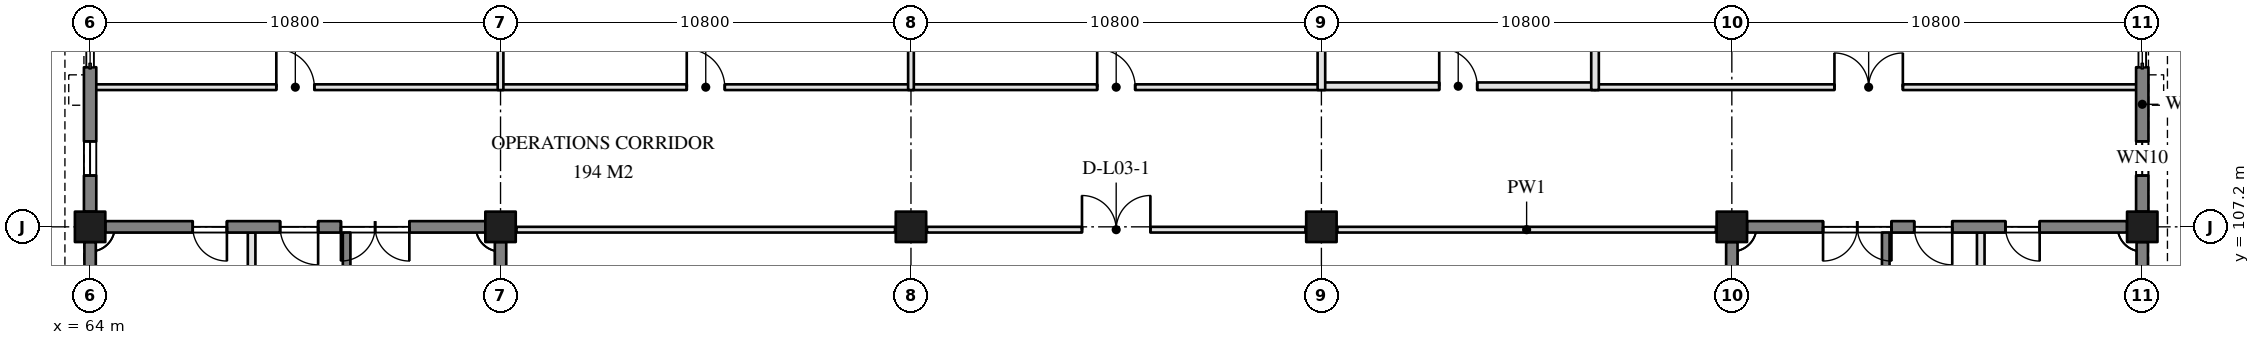
"""IFC4 building model, lengths in metres.
Left out: names, types, materials, properties, quantities, classifications, styles, units other than length and angle.
Written with IfcOpenShell. Run it as: python <this file> out.ifc"""

import sys

from ifc_helpers import new_model, si_unit, direction, frame, frame_2d, origin, origin_2d, place, context, subcontext, project, spatial, rectangle, extrude, element, fill, save


model = new_model("IFC4")
c1 = context("Model", 3, precision=1e-05, world=origin(), true_north=direction((0.0, 1.0)))
c2 = subcontext(c1, "Body", "Model", "MODEL_VIEW")
j1 = project(units=[si_unit("LENGTHUNIT", "METRE"), si_unit("PLANEANGLEUNIT", "RADIAN")], contexts=[c1])
p1 = place(None, origin())
s1 = spatial("IfcSite", under=j1, at=p1, CompositionType="ELEMENT")
p2 = place(p1, origin())
s2 = spatial("IfcBuilding", under=s1, at=p2, CompositionType="ELEMENT")
p3 = place(p2, frame((0.0, 0.0, 12.6)))
s3 = spatial("IfcBuildingStorey", under=s2, at=p3, CompositionType="ELEMENT", Elevation=12.6)
for number, where, z_axis, x_axis in (
    (1, (64.0, 107.2, 0.0), (0.0, 0.0, 1.0), (1.0, 0.0, 0.0)),
    (2, (74.8, 107.2, 0.0), (0.0, 0.0, 1.0), (1.0, 0.0, 0.0)),
    (3, (85.6, 107.2, 0.0), (0.0, 0.0, 1.0), (1.0, 0.0, 0.0)),
    (4, (96.4, 107.2, 0.0), (0.0, 0.0, 1.0), (1.0, 0.0, 0.0)),
    (5, (107.2, 107.2, 0.0), (0.0, 0.0, 1.0), (1.0, 0.0, 0.0)),
    (6, (118.0, 107.2, 0.0), (0.0, 0.0, 1.0), (1.0, 0.0, 0.0)),
):
    element("IfcColumn", number, at=place(p3, frame(where, z_axis=z_axis, x_axis=x_axis)), inside=s3, PredefinedType="COLUMN", context=c2, shape_type="SweptSolid", body=[
        extrude(rectangle(XDim=0.8, YDim=0.8, at=origin_2d()), origin(), (0.0, 0.0, 1.0), 3.9),
    ])
p4 = place(p3, frame((74.8, 96.8, 0.0), z_axis=(0.0, 0.0, 1.0), x_axis=(0.0, 1.0, 0.0)))
e7 = element("IfcWall", 7, at=p4, inside=s3, PredefinedType="SOLIDWALL", context=c2, shape_type="SweptSolid", body=[
    extrude(rectangle(XDim=10.0, YDim=0.3, at=frame_2d((5.0, 0.0))), origin(), (0.0, 0.0, 1.0), 3.9),
])
p5 = place(p3, frame((74.4, 107.2, 0.0), z_axis=(0.0, 0.0, 1.0), x_axis=(-1.0, 0.0, 0.0)))
e8 = element("IfcWall", 8, at=p5, inside=s3, PredefinedType="SOLIDWALL", context=c2, shape_type="SweptSolid", body=[
    extrude(rectangle(XDim=10.0, YDim=0.3, at=frame_2d((5.0, 0.0))), origin(), (0.0, 0.0, 1.0), 3.9),
])
p6 = place(p5, frame((2.0, 0.0, 0.0)))
e9 = element("IfcOpeningElement", 9, at=p6, cuts=e8, PredefinedType="OPENING", context=c2, shape_type="SweptSolid", body=[
    extrude(rectangle(XDim=1.8, YDim=2.1, at=frame_2d((0.9, 1.05))), frame((0.0, 0.16, 0.0), z_axis=(0.0, -1.0, 0.0), x_axis=(1.0, 0.0, 0.0)), (0.0, 0.0, 1.0), 0.32),
])
p7 = place(p5, frame((4.4, 0.0, 0.0)))
e10 = element("IfcOpeningElement", 10, at=p7, cuts=e8, PredefinedType="OPENING", context=c2, shape_type="SweptSolid", body=[
    extrude(rectangle(XDim=1.0, YDim=2.1, at=frame_2d((0.5, 1.05))), frame((0.0, 0.16, 0.0), z_axis=(0.0, -1.0, 0.0), x_axis=(1.0, 0.0, 0.0)), (0.0, 0.0, 1.0), 0.32),
])
p8 = place(p5, frame((6.8, 0.0, 0.0)))
e11 = element("IfcOpeningElement", 11, at=p8, cuts=e8, PredefinedType="OPENING", context=c2, shape_type="SweptSolid", body=[
    extrude(rectangle(XDim=0.9, YDim=2.1, at=frame_2d((0.45, 1.05))), frame((0.0, 0.16, 0.0), z_axis=(0.0, -1.0, 0.0), x_axis=(1.0, 0.0, 0.0)), (0.0, 0.0, 1.0), 0.32),
])
for number, where, z_axis, x_axis in (
    (12, (64.0, 106.8, 0.0), (0.0, 0.0, 1.0), (0.0, -1.0, 0.0)),
    (13, (118.0, 96.8, 0.0), (0.0, 0.0, 1.0), (0.0, 1.0, 0.0)),
):
    element("IfcWall", number, at=place(p3, frame(where, z_axis=z_axis, x_axis=x_axis)), inside=s3, PredefinedType="SOLIDWALL", context=c2, shape_type="SweptSolid", body=[
        extrude(rectangle(XDim=10.0, YDim=0.3, at=frame_2d((5.0, 0.0))), origin(), (0.0, 0.0, 1.0), 3.9),
    ])
p9 = place(p3, frame((117.6, 107.2, 0.0), z_axis=(0.0, 0.0, 1.0), x_axis=(-1.0, 0.0, 0.0)))
e14 = element("IfcWall", 14, at=p9, inside=s3, PredefinedType="SOLIDWALL", context=c2, shape_type="SweptSolid", body=[
    extrude(rectangle(XDim=10.0, YDim=0.3, at=frame_2d((5.0, 0.0))), origin(), (0.0, 0.0, 1.0), 3.9),
])
p10 = place(p9, frame((6.2, 0.0, 0.0)))
e15 = element("IfcOpeningElement", 15, at=p10, cuts=e14, PredefinedType="OPENING", context=c2, shape_type="SweptSolid", body=[
    extrude(rectangle(XDim=1.8, YDim=2.1, at=frame_2d((0.9, 1.05))), frame((0.0, 0.16, 0.0), z_axis=(0.0, -1.0, 0.0), x_axis=(1.0, 0.0, 0.0)), (0.0, 0.0, 1.0), 0.32),
])
p11 = place(p9, frame((4.6, 0.0, 0.0)))
e16 = element("IfcOpeningElement", 16, at=p11, cuts=e14, PredefinedType="OPENING", context=c2, shape_type="SweptSolid", body=[
    extrude(rectangle(XDim=1.0, YDim=2.1, at=frame_2d((0.5, 1.05))), frame((0.0, 0.16, 0.0), z_axis=(0.0, -1.0, 0.0), x_axis=(1.0, 0.0, 0.0)), (0.0, 0.0, 1.0), 0.32),
])
p12 = place(p9, frame((2.3, 0.0, 0.0)))
e17 = element("IfcOpeningElement", 17, at=p12, cuts=e14, PredefinedType="OPENING", context=c2, shape_type="SweptSolid", body=[
    extrude(rectangle(XDim=0.9, YDim=2.1, at=frame_2d((0.45, 1.05))), frame((0.0, 0.16, 0.0), z_axis=(0.0, -1.0, 0.0), x_axis=(1.0, 0.0, 0.0)), (0.0, 0.0, 1.0), 0.32),
])
p13 = place(p3, frame((107.2, 106.8, 0.0), z_axis=(0.0, 0.0, 1.0), x_axis=(0.0, -1.0, 0.0)))
e18 = element("IfcWall", 18, at=p13, inside=s3, PredefinedType="SOLIDWALL", context=c2, shape_type="SweptSolid", body=[
    extrude(rectangle(XDim=10.0, YDim=0.3, at=frame_2d((5.0, 0.0))), origin(), (0.0, 0.0, 1.0), 3.9),
])
p14 = place(p3, frame((64.0, 107.6, 0.0), z_axis=(0.0, 0.0, 1.0), x_axis=(0.0, 1.0, 0.0)))
e19 = element("IfcWall", 19, at=p14, inside=s3, PredefinedType="SOLIDWALL", context=c2, shape_type="SweptSolid", body=[
    extrude(rectangle(XDim=3.8, YDim=0.325, at=frame_2d((1.9, 0.0))), origin(), (0.0, 0.0, 1.0), 2.8),
])
p15 = place(p14, frame((0.95, 0.0, 0.7)))
e20 = element("IfcOpeningElement", 20, at=p15, cuts=e19, PredefinedType="OPENING", context=c2, shape_type="SweptSolid", body=[
    extrude(rectangle(XDim=0.9, YDim=2.0, at=frame_2d((0.45, 1.0))), frame((0.0, 0.172, 0.0), z_axis=(0.0, -1.0, 0.0), x_axis=(1.0, 0.0, 0.0)), (0.0, 0.0, 1.0), 0.345),
])
p16 = place(p3, frame((118.0, 107.6, 0.0), z_axis=(0.0, 0.0, 1.0), x_axis=(0.0, 1.0, 0.0)))
e21 = element("IfcWall", 21, at=p16, inside=s3, PredefinedType="SOLIDWALL", context=c2, shape_type="SweptSolid", body=[
    extrude(rectangle(XDim=3.8, YDim=0.325, at=frame_2d((1.9, 0.0))), origin(), (0.0, 0.0, 1.0), 2.8),
])
p17 = place(p16, frame((0.95, 0.0, 0.7)))
e22 = element("IfcOpeningElement", 22, at=p17, cuts=e21, PredefinedType="OPENING", context=c2, shape_type="SweptSolid", body=[
    extrude(rectangle(XDim=0.9, YDim=2.0, at=frame_2d((0.45, 1.0))), frame((0.0, 0.172, 0.0), z_axis=(0.0, -1.0, 0.0), x_axis=(1.0, 0.0, 0.0)), (0.0, 0.0, 1.0), 0.345),
])
p18 = place(p3, frame((70.75, 104.8, 0.0), z_axis=(0.0, 0.0, 1.0), x_axis=(0.0, 1.0, 0.0)))
e23 = element("IfcWall", 23, at=p18, inside=s3, PredefinedType="SOLIDWALL", context=c2, shape_type="SweptSolid", body=[
    extrude(rectangle(XDim=2.25, YDim=0.2, at=frame_2d((1.125, 0.0))), origin(), (0.0, 0.0, 1.0), 3.6),
])
p19 = place(p3, frame((68.25, 104.8, 0.0), z_axis=(0.0, 0.0, 1.0), x_axis=(0.0, 1.0, 0.0)))
e24 = element("IfcWall", 24, at=p19, inside=s3, PredefinedType="PARTITIONING", context=c2, shape_type="SweptSolid", body=[
    extrude(rectangle(XDim=2.25, YDim=0.2, at=frame_2d((1.125, 0.0))), origin(), (0.0, 0.0, 1.0), 3.6),
])
p20 = place(p3, frame((111.25, 107.05, 0.0), z_axis=(0.0, 0.0, 1.0), x_axis=(0.0, -1.0, 0.0)))
e25 = element("IfcWall", 25, at=p20, inside=s3, PredefinedType="SOLIDWALL", context=c2, shape_type="SweptSolid", body=[
    extrude(rectangle(XDim=2.25, YDim=0.2, at=frame_2d((1.125, 0.0))), origin(), (0.0, 0.0, 1.0), 3.6),
])
p21 = place(p3, frame((113.75, 107.05, 0.0), z_axis=(0.0, 0.0, 1.0), x_axis=(0.0, -1.0, 0.0)))
e26 = element("IfcWall", 26, at=p21, inside=s3, PredefinedType="PARTITIONING", context=c2, shape_type="SweptSolid", body=[
    extrude(rectangle(XDim=2.25, YDim=0.2, at=frame_2d((1.125, 0.0))), origin(), (0.0, 0.0, 1.0), 3.6),
])
p22 = place(p3, frame((96.82, 107.125, 0.0), z_axis=(0.0, 0.0, 1.0), x_axis=(1.0, 0.0, 0.0)))
e27 = element("IfcWall", 27, at=p22, inside=s3, PredefinedType="PARTITIONING", context=c2, shape_type="SweptSolid", body=[
    extrude(rectangle(XDim=9.96, YDim=0.15, at=frame_2d((4.98, 0.0))), origin(), (0.0, 0.0, 1.0), 2.8),
])
p23 = place(p3, frame((86.02, 107.125, 0.0), z_axis=(0.0, 0.0, 1.0), x_axis=(1.0, 0.0, 0.0)))
e28 = element("IfcWall", 28, at=p23, inside=s3, PredefinedType="PARTITIONING", context=c2, shape_type="SweptSolid", body=[
    extrude(rectangle(XDim=9.96, YDim=0.15, at=frame_2d((4.98, 0.0))), origin(), (0.0, 0.0, 1.0), 2.8),
])
p24 = place(p23, frame((4.08, 0.0, 0.0)))
e29 = element("IfcOpeningElement", 29, at=p24, cuts=e28, PredefinedType="OPENING", context=c2, shape_type="SweptSolid", body=[
    extrude(rectangle(XDim=1.8, YDim=2.1, at=frame_2d((0.9, 1.05))), frame((0.0, 0.085, 0.0), z_axis=(0.0, -1.0, 0.0), x_axis=(1.0, 0.0, 0.0)), (0.0, 0.0, 1.0), 0.17),
])
p25 = place(p3, frame((75.22, 107.125, 0.0), z_axis=(0.0, 0.0, 1.0), x_axis=(1.0, 0.0, 0.0)))
e30 = element("IfcWall", 30, at=p25, inside=s3, PredefinedType="PARTITIONING", context=c2, shape_type="SweptSolid", body=[
    extrude(rectangle(XDim=9.96, YDim=0.15, at=frame_2d((4.98, 0.0))), origin(), (0.0, 0.0, 1.0), 2.8),
])
p26 = place(p3, frame((64.0, 110.875, 0.0), z_axis=(0.0, 0.0, 1.0), x_axis=(1.0, 0.0, 0.0)))
e31 = element("IfcWall", 31, at=p26, inside=s3, PredefinedType="PARTITIONING", context=c2, shape_type="SweptSolid", body=[
    extrude(rectangle(XDim=10.8, YDim=0.15, at=frame_2d((5.4, 0.0))), origin(), (0.0, 0.0, 1.0), 2.8),
])
p27 = place(p26, frame((4.9, 0.0, 0.0)))
e32 = element("IfcOpeningElement", 32, at=p27, cuts=e31, PredefinedType="OPENING", context=c2, shape_type="SweptSolid", body=[
    extrude(rectangle(XDim=1.0, YDim=2.1, at=frame_2d((0.5, 1.05))), frame((0.0, 0.085, 0.0), z_axis=(0.0, -1.0, 0.0), x_axis=(1.0, 0.0, 0.0)), (0.0, 0.0, 1.0), 0.17),
])
p28 = place(p3, frame((74.8, 110.875, 0.0), z_axis=(0.0, 0.0, 1.0), x_axis=(1.0, 0.0, 0.0)))
e33 = element("IfcWall", 33, at=p28, inside=s3, PredefinedType="PARTITIONING", context=c2, shape_type="SweptSolid", body=[
    extrude(rectangle(XDim=10.8, YDim=0.15, at=frame_2d((5.4, 0.0))), origin(), (0.0, 0.0, 1.0), 2.8),
])
p29 = place(p28, frame((4.9, 0.0, 0.0)))
e34 = element("IfcOpeningElement", 34, at=p29, cuts=e33, PredefinedType="OPENING", context=c2, shape_type="SweptSolid", body=[
    extrude(rectangle(XDim=1.0, YDim=2.1, at=frame_2d((0.5, 1.05))), frame((0.0, 0.085, 0.0), z_axis=(0.0, -1.0, 0.0), x_axis=(1.0, 0.0, 0.0)), (0.0, 0.0, 1.0), 0.17),
])
p30 = place(p3, frame((85.6, 110.875, 0.0), z_axis=(0.0, 0.0, 1.0), x_axis=(1.0, 0.0, 0.0)))
e35 = element("IfcWall", 35, at=p30, inside=s3, PredefinedType="PARTITIONING", context=c2, shape_type="SweptSolid", body=[
    extrude(rectangle(XDim=10.8, YDim=0.15, at=frame_2d((5.4, 0.0))), origin(), (0.0, 0.0, 1.0), 2.8),
])
p31 = place(p30, frame((4.9, 0.0, 0.0)))
e36 = element("IfcOpeningElement", 36, at=p31, cuts=e35, PredefinedType="OPENING", context=c2, shape_type="SweptSolid", body=[
    extrude(rectangle(XDim=1.0, YDim=2.1, at=frame_2d((0.5, 1.05))), frame((0.0, 0.085, 0.0), z_axis=(0.0, -1.0, 0.0), x_axis=(1.0, 0.0, 0.0)), (0.0, 0.0, 1.0), 0.17),
])
p32 = place(p3, frame((96.4, 110.9, 0.0), z_axis=(0.0, 0.0, 1.0), x_axis=(1.0, 0.0, 0.0)))
e37 = element("IfcWall", 37, at=p32, inside=s3, PredefinedType="PARTITIONING", context=c2, shape_type="SweptSolid", body=[
    extrude(rectangle(XDim=7.2, YDim=0.2, at=frame_2d((3.6, 0.0))), origin(), (0.0, 0.0, 1.0), 2.8),
])
p33 = place(p32, frame((3.1, 0.0, 0.0)))
e38 = element("IfcOpeningElement", 38, at=p33, cuts=e37, PredefinedType="OPENING", context=c2, shape_type="SweptSolid", body=[
    extrude(rectangle(XDim=1.0, YDim=2.1, at=frame_2d((0.5, 1.05))), frame((0.0, 0.11, 0.0), z_axis=(0.0, -1.0, 0.0), x_axis=(1.0, 0.0, 0.0)), (0.0, 0.0, 1.0), 0.22),
])
p34 = place(p3, frame((103.6, 110.875, 0.0), z_axis=(0.0, 0.0, 1.0), x_axis=(1.0, 0.0, 0.0)))
e39 = element("IfcWall", 39, at=p34, inside=s3, PredefinedType="PARTITIONING", context=c2, shape_type="SweptSolid", body=[
    extrude(rectangle(XDim=14.4, YDim=0.15, at=frame_2d((7.2, 0.0))), origin(), (0.0, 0.0, 1.0), 2.8),
])
p35 = place(p34, frame((6.3, 0.0, 0.0)))
e40 = element("IfcOpeningElement", 40, at=p35, cuts=e39, PredefinedType="OPENING", context=c2, shape_type="SweptSolid", body=[
    extrude(rectangle(XDim=1.8, YDim=2.1, at=frame_2d((0.9, 1.05))), frame((0.0, 0.085, 0.0), z_axis=(0.0, -1.0, 0.0), x_axis=(1.0, 0.0, 0.0)), (0.0, 0.0, 1.0), 0.17),
])
for number, where, z_axis, x_axis in (
    (41, (74.8, 110.8, 0.0), (0.0, 0.0, 1.0), (0.0, 1.0, 0.0)),
    (42, (85.6, 110.8, 0.0), (0.0, 0.0, 1.0), (0.0, 1.0, 0.0)),
):
    element("IfcWall", number, at=place(p3, frame(where, z_axis=z_axis, x_axis=x_axis)), inside=s3, PredefinedType="PARTITIONING", context=c2, shape_type="SweptSolid", body=[
        extrude(rectangle(XDim=6.78, YDim=0.15, at=frame_2d((3.39, 0.0))), origin(), (0.0, 0.0, 1.0), 2.8),
    ])
p36 = place(p3, frame((96.4, 110.8, 0.0), z_axis=(0.0, 0.0, 1.0), x_axis=(0.0, 1.0, 0.0)))
e43 = element("IfcWall", 43, at=p36, inside=s3, PredefinedType="PARTITIONING", context=c2, shape_type="SweptSolid", body=[
    extrude(rectangle(XDim=6.78, YDim=0.2, at=frame_2d((3.39, 0.0))), origin(), (0.0, 0.0, 1.0), 2.8),
])
p37 = place(p3, frame((103.6, 110.8, 0.0), z_axis=(0.0, 0.0, 1.0), x_axis=(0.0, 1.0, 0.0)))
e44 = element("IfcWall", 44, at=p37, inside=s3, PredefinedType="PARTITIONING", context=c2, shape_type="SweptSolid", body=[
    extrude(rectangle(XDim=7.2, YDim=0.2, at=frame_2d((3.6, 0.0))), origin(), (0.0, 0.0, 1.0), 2.8),
])
p38 = place(p15, origin())
e45 = element("IfcWindow", 45, at=p38, inside=s3, PartitioningType="SINGLE_PANEL", PredefinedType="WINDOW", context=c2, shape_type="SweptSolid", body=[
    extrude(rectangle(XDim=0.9, YDim=2.0, at=frame_2d((0.45, 1.0))), frame((0.0, 0.03, 0.0), z_axis=(0.0, -1.0, 0.0), x_axis=(1.0, 0.0, 0.0)), (0.0, 0.0, 1.0), 0.06),
])
fill(e20, e45)
p39 = place(p17, origin())
e46 = element("IfcWindow", 46, at=p39, inside=s3, PartitioningType="SINGLE_PANEL", PredefinedType="WINDOW", context=c2, shape_type="SweptSolid", body=[
    extrude(rectangle(XDim=0.9, YDim=2.0, at=frame_2d((0.45, 1.0))), frame((0.0, 0.03, 0.0), z_axis=(0.0, -1.0, 0.0), x_axis=(1.0, 0.0, 0.0)), (0.0, 0.0, 1.0), 0.06),
])
fill(e22, e46)
p40 = place(p6, frame((1.8, 0.0, 0.0), z_axis=(0.0, 0.0, 1.0), x_axis=(-1.0, 0.0, 0.0)))
e47 = element("IfcDoor", 47, at=p40, inside=s3, OperationType="DOUBLE_DOOR_DOUBLE_SWING", PredefinedType="DOOR", context=c2, shape_type="SweptSolid", body=[
    extrude(rectangle(XDim=1.8, YDim=2.1, at=frame_2d((0.9, 1.05))), frame((0.0, 0.025, 0.0), z_axis=(0.0, -1.0, 0.0), x_axis=(1.0, 0.0, 0.0)), (0.0, 0.0, 1.0), 0.05),
])
fill(e9, e47)
p41 = place(p7, origin())
e48 = element("IfcDoor", 48, at=p41, inside=s3, OperationType="SINGLE_SWING_LEFT", PredefinedType="DOOR", context=c2, shape_type="SweptSolid", body=[
    extrude(rectangle(XDim=1.0, YDim=2.1, at=frame_2d((0.5, 1.05))), frame((0.0, 0.025, 0.0), z_axis=(0.0, -1.0, 0.0), x_axis=(1.0, 0.0, 0.0)), (0.0, 0.0, 1.0), 0.05),
])
fill(e10, e48)
p42 = place(p8, origin())
e49 = element("IfcDoor", 49, at=p42, inside=s3, OperationType="SINGLE_SWING_RIGHT", PredefinedType="DOOR", context=c2, shape_type="SweptSolid", body=[
    extrude(rectangle(XDim=0.9, YDim=2.1, at=frame_2d((0.45, 1.05))), frame((0.0, 0.025, 0.0), z_axis=(0.0, -1.0, 0.0), x_axis=(1.0, 0.0, 0.0)), (0.0, 0.0, 1.0), 0.05),
])
fill(e11, e49)
p43 = place(p10, frame((1.8, 0.0, 0.0), z_axis=(0.0, 0.0, 1.0), x_axis=(-1.0, 0.0, 0.0)))
e50 = element("IfcDoor", 50, at=p43, inside=s3, OperationType="DOUBLE_DOOR_DOUBLE_SWING", PredefinedType="DOOR", context=c2, shape_type="SweptSolid", body=[
    extrude(rectangle(XDim=1.8, YDim=2.1, at=frame_2d((0.9, 1.05))), frame((0.0, 0.025, 0.0), z_axis=(0.0, -1.0, 0.0), x_axis=(1.0, 0.0, 0.0)), (0.0, 0.0, 1.0), 0.05),
])
fill(e15, e50)
p44 = place(p11, origin())
e51 = element("IfcDoor", 51, at=p44, inside=s3, OperationType="SINGLE_SWING_RIGHT", PredefinedType="DOOR", context=c2, shape_type="SweptSolid", body=[
    extrude(rectangle(XDim=1.0, YDim=2.1, at=frame_2d((0.5, 1.05))), frame((0.0, 0.025, 0.0), z_axis=(0.0, -1.0, 0.0), x_axis=(1.0, 0.0, 0.0)), (0.0, 0.0, 1.0), 0.05),
])
fill(e16, e51)
p45 = place(p12, origin())
e52 = element("IfcDoor", 52, at=p45, inside=s3, OperationType="SINGLE_SWING_LEFT", PredefinedType="DOOR", context=c2, shape_type="SweptSolid", body=[
    extrude(rectangle(XDim=0.9, YDim=2.1, at=frame_2d((0.45, 1.05))), frame((0.0, 0.025, 0.0), z_axis=(0.0, -1.0, 0.0), x_axis=(1.0, 0.0, 0.0)), (0.0, 0.0, 1.0), 0.05),
])
fill(e17, e52)
p46 = place(p24, frame((1.8, 0.0, 0.0), z_axis=(0.0, 0.0, 1.0), x_axis=(-1.0, 0.0, 0.0)))
e53 = element("IfcDoor", 53, at=p46, inside=s3, OperationType="DOUBLE_DOOR_DOUBLE_SWING", PredefinedType="DOOR", context=c2, shape_type="SweptSolid", body=[
    extrude(rectangle(XDim=1.8, YDim=2.1, at=frame_2d((0.9, 1.05))), frame((0.0, 0.025, 0.0), z_axis=(0.0, -1.0, 0.0), x_axis=(1.0, 0.0, 0.0)), (0.0, 0.0, 1.0), 0.05),
])
fill(e29, e53)
p47 = place(p27, frame((1.0, 0.0, 0.0), z_axis=(0.0, 0.0, 1.0), x_axis=(-1.0, 0.0, 0.0)))
e54 = element("IfcDoor", 54, at=p47, inside=s3, OperationType="SINGLE_SWING_LEFT", PredefinedType="DOOR", context=c2, shape_type="SweptSolid", body=[
    extrude(rectangle(XDim=1.0, YDim=2.1, at=frame_2d((0.5, 1.05))), frame((0.0, 0.025, 0.0), z_axis=(0.0, -1.0, 0.0), x_axis=(1.0, 0.0, 0.0)), (0.0, 0.0, 1.0), 0.05),
])
fill(e32, e54)
p48 = place(p29, frame((1.0, 0.0, 0.0), z_axis=(0.0, 0.0, 1.0), x_axis=(-1.0, 0.0, 0.0)))
e55 = element("IfcDoor", 55, at=p48, inside=s3, OperationType="SINGLE_SWING_RIGHT", PredefinedType="DOOR", context=c2, shape_type="SweptSolid", body=[
    extrude(rectangle(XDim=1.0, YDim=2.1, at=frame_2d((0.5, 1.05))), frame((0.0, 0.025, 0.0), z_axis=(0.0, -1.0, 0.0), x_axis=(1.0, 0.0, 0.0)), (0.0, 0.0, 1.0), 0.05),
])
fill(e34, e55)
p49 = place(p31, frame((1.0, 0.0, 0.0), z_axis=(0.0, 0.0, 1.0), x_axis=(-1.0, 0.0, 0.0)))
e56 = element("IfcDoor", 56, at=p49, inside=s3, OperationType="SINGLE_SWING_RIGHT", PredefinedType="DOOR", context=c2, shape_type="SweptSolid", body=[
    extrude(rectangle(XDim=1.0, YDim=2.1, at=frame_2d((0.5, 1.05))), frame((0.0, 0.025, 0.0), z_axis=(0.0, -1.0, 0.0), x_axis=(1.0, 0.0, 0.0)), (0.0, 0.0, 1.0), 0.05),
])
fill(e36, e56)
p50 = place(p33, origin())
e57 = element("IfcDoor", 57, at=p50, inside=s3, OperationType="SINGLE_SWING_LEFT", PredefinedType="DOOR", context=c2, shape_type="SweptSolid", body=[
    extrude(rectangle(XDim=1.0, YDim=2.1, at=frame_2d((0.5, 1.05))), frame((0.0, 0.025, 0.0), z_axis=(0.0, -1.0, 0.0), x_axis=(1.0, 0.0, 0.0)), (0.0, 0.0, 1.0), 0.05),
])
fill(e38, e57)
p51 = place(p35, origin())
e58 = element("IfcDoor", 58, at=p51, inside=s3, OperationType="DOUBLE_DOOR_DOUBLE_SWING", PredefinedType="DOOR", context=c2, shape_type="SweptSolid", body=[
    extrude(rectangle(XDim=1.8, YDim=2.1, at=frame_2d((0.9, 1.05))), frame((0.0, 0.025, 0.0), z_axis=(0.0, -1.0, 0.0), x_axis=(1.0, 0.0, 0.0)), (0.0, 0.0, 1.0), 0.05),
])
fill(e40, e58)
save(model, sys.argv[1])
